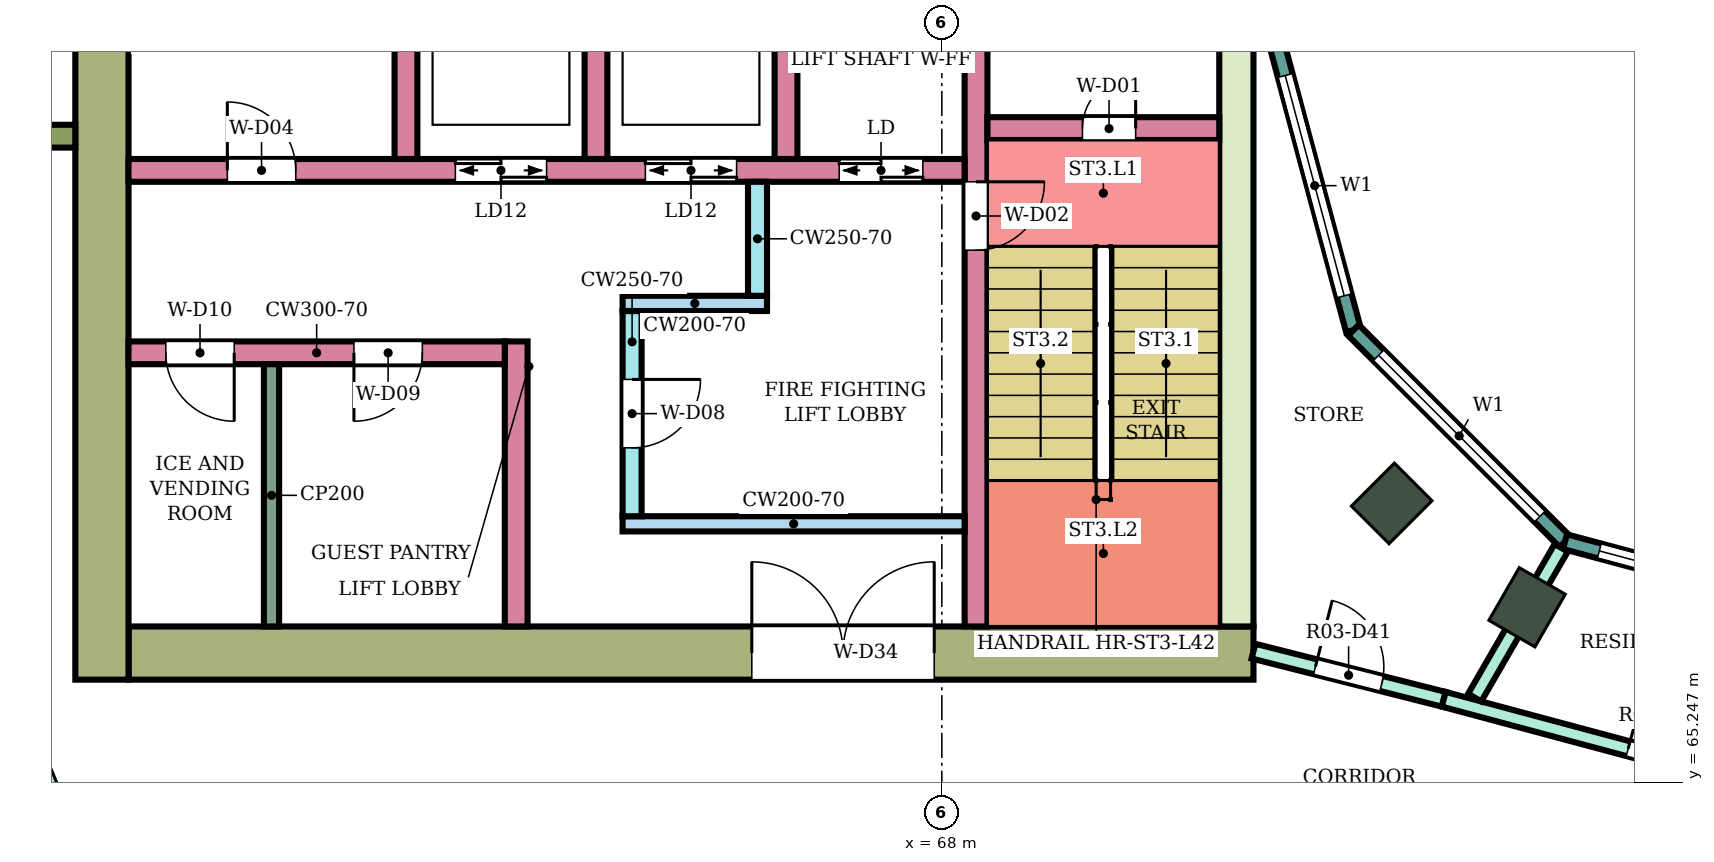
"""IFC4 building model, lengths in metres.
Left out: names, types, materials, properties, quantities, classifications, styles, units other than length and angle.
Written with IfcOpenShell. Run it as: python <this file> out.ifc"""

import sys

from ifc_helpers import new_model, si_unit, direction, frame, frame_2d, origin, origin_2d, place, context, subcontext, project, spatial, rectangle, extrude, element, fill, save


model = new_model("IFC4")
c1 = context("Model", 3, precision=1e-05, world=origin(), true_north=direction((0.0, 1.0)))
c2 = subcontext(c1, "Body", "Model", "MODEL_VIEW")
j1 = project(units=[si_unit("LENGTHUNIT", "METRE"), si_unit("PLANEANGLEUNIT", "RADIAN")], contexts=[c1])
p1 = place(None, origin())
s1 = spatial("IfcSite", under=j1, at=p1, CompositionType="ELEMENT")
p2 = place(p1, origin())
s2 = spatial("IfcBuilding", under=s1, at=p2, CompositionType="ELEMENT")
p3 = place(p2, frame((0.0, 0.0, 182.3)))
s3 = spatial("IfcBuildingStorey", under=s2, at=p3, CompositionType="ELEMENT", Elevation=182.3)
for number, where, z_axis, x_axis in (
    (1, (73.919, 68.919, 0.0), (0.0, 0.0, 1.0), (-0.707, -0.707, 0.0)),
    (2, (75.7, 67.552, 0.0), (0.0, 0.0, 1.0), (-0.5, -0.866, 0.0)),
):
    element("IfcColumn", number, at=place(p3, frame(where, z_axis=z_axis, x_axis=x_axis)), inside=s3, PredefinedType="COLUMN", context=c2, shape_type="SweptSolid", body=[
        extrude(rectangle(XDim=0.8, YDim=0.7, at=origin_2d()), origin(), (0.0, 0.0, 1.0), 4.1),
    ])
p4 = place(p3, frame((72.1, 66.95, 0.0), z_axis=(0.0, 0.0, 1.0), x_axis=(-1.0, 0.0, 0.0)))
e3 = element("IfcWall", 3, at=p4, inside=s3, PredefinedType="SHEAR", context=c2, shape_type="SweptSolid", body=[
    extrude(rectangle(XDim=14.8, YDim=0.7, at=frame_2d((7.4, 0.0))), origin(), (0.0, 0.0, 1.0), 3.78),
])
p5 = place(p4, frame((4.2, 0.0, 0.0)))
e4 = element("IfcOpeningElement", 4, at=p5, cuts=e3, PredefinedType="OPENING", context=c2, shape_type="SweptSolid", body=[
    extrude(rectangle(XDim=2.4, YDim=2.4, at=frame_2d((1.2, 1.2))), frame((0.0, 0.36, 0.0), z_axis=(0.0, -1.0, 0.0), x_axis=(1.0, 0.0, 0.0)), (0.0, 0.0, 1.0), 0.72),
])
p6 = place(p3, frame((71.875, 75.0, 0.0), z_axis=(0.0, 0.0, 1.0), x_axis=(0.0, -1.0, 0.0)))
e5 = element("IfcWall", 5, at=p6, inside=s3, PredefinedType="SHEAR", context=c2, shape_type="SweptSolid", body=[
    extrude(rectangle(XDim=7.7, YDim=0.45, at=frame_2d((3.85, 0.0))), origin(), (0.0, 0.0, 1.0), 3.78),
])
p7 = place(p3, frame((56.95, 83.4, 0.0), z_axis=(0.0, 0.0, 1.0), x_axis=(0.0, -1.0, 0.0)))
e6 = element("IfcWall", 6, at=p7, inside=s3, PredefinedType="SHEAR", context=c2, shape_type="SweptSolid", body=[
    extrude(rectangle(XDim=16.8, YDim=0.7, at=frame_2d((8.4, 0.0))), origin(), (0.0, 0.0, 1.0), 3.78),
])
p8 = place(p3, frame((68.45, 75.0, 0.0), z_axis=(0.0, 0.0, 1.0), x_axis=(0.0, -1.0, 0.0)))
e7 = element("IfcWall", 7, at=p8, inside=s3, PredefinedType="SHEAR", context=c2, shape_type="SweptSolid", body=[
    extrude(rectangle(XDim=7.7, YDim=0.3, at=frame_2d((3.85, 0.0))), origin(), (0.0, 0.0, 1.0), 3.78),
])
p9 = place(p8, frame((1.85, 0.0, 0.0)))
e8 = element("IfcOpeningElement", 8, at=p9, cuts=e7, PredefinedType="OPENING", context=c2, shape_type="SweptSolid", body=[
    extrude(rectangle(XDim=0.9, YDim=2.1, at=frame_2d((0.45, 1.05))), frame((0.0, 0.16, 0.0), z_axis=(0.0, -1.0, 0.0), x_axis=(1.0, 0.0, 0.0)), (0.0, 0.0, 1.0), 0.32),
])
p10 = place(p3, frame((71.65, 73.85, 0.0), z_axis=(0.0, 0.0, 1.0), x_axis=(-1.0, 0.0, 0.0)))
e9 = element("IfcWall", 9, at=p10, inside=s3, PredefinedType="SHEAR", context=c2, shape_type="SweptSolid", body=[
    extrude(rectangle(XDim=3.05, YDim=0.3, at=frame_2d((1.525, 0.0))), origin(), (0.0, 0.0, 1.0), 3.78),
])
p11 = place(p10, frame((1.1, 0.0, 0.0)))
e10 = element("IfcOpeningElement", 10, at=p11, cuts=e9, PredefinedType="OPENING", context=c2, shape_type="SweptSolid", body=[
    extrude(rectangle(XDim=0.7, YDim=2.0, at=frame_2d((0.35, 1.0))), frame((0.0, 0.16, 0.0), z_axis=(0.0, -1.0, 0.0), x_axis=(1.0, 0.0, 0.0)), (0.0, 0.0, 1.0), 0.32),
])
p12 = place(p3, frame((68.3, 73.3, 0.0), z_axis=(0.0, 0.0, 1.0), x_axis=(-1.0, 0.0, 0.0)))
e11 = element("IfcWall", 11, at=p12, inside=s3, PredefinedType="SHEAR", context=c2, shape_type="SweptSolid", body=[
    extrude(rectangle(XDim=11.0, YDim=0.3, at=frame_2d((5.5, 0.0))), origin(), (0.0, 0.0, 1.0), 3.78),
])
p13 = place(p12, frame((0.55, 0.0, 0.0)))
e12 = element("IfcOpeningElement", 12, at=p13, cuts=e11, PredefinedType="OPENING", context=c2, shape_type="SweptSolid", body=[
    extrude(rectangle(XDim=1.1, YDim=2.1, at=frame_2d((0.55, 1.05))), frame((0.0, 0.16, 0.0), z_axis=(0.0, -1.0, 0.0), x_axis=(1.0, 0.0, 0.0)), (0.0, 0.0, 1.0), 0.32),
])
p14 = place(p12, frame((3.0, 0.0, 0.0)))
e13 = element("IfcOpeningElement", 13, at=p14, cuts=e11, PredefinedType="OPENING", context=c2, shape_type="SweptSolid", body=[
    extrude(rectangle(XDim=1.2, YDim=2.1, at=frame_2d((0.6, 1.05))), frame((0.0, 0.16, 0.0), z_axis=(0.0, -1.0, 0.0), x_axis=(1.0, 0.0, 0.0)), (0.0, 0.0, 1.0), 0.32),
])
p15 = place(p12, frame((5.5, 0.0, 0.0)))
e14 = element("IfcOpeningElement", 14, at=p15, cuts=e11, PredefinedType="OPENING", context=c2, shape_type="SweptSolid", body=[
    extrude(rectangle(XDim=1.2, YDim=2.1, at=frame_2d((0.6, 1.05))), frame((0.0, 0.16, 0.0), z_axis=(0.0, -1.0, 0.0), x_axis=(1.0, 0.0, 0.0)), (0.0, 0.0, 1.0), 0.32),
])
p16 = place(p12, frame((8.8, 0.0, 0.0)))
e15 = element("IfcOpeningElement", 15, at=p16, cuts=e11, PredefinedType="OPENING", context=c2, shape_type="SweptSolid", body=[
    extrude(rectangle(XDim=0.9, YDim=2.1, at=frame_2d((0.45, 1.05))), frame((0.0, 0.16, 0.0), z_axis=(0.0, -1.0, 0.0), x_axis=(1.0, 0.0, 0.0)), (0.0, 0.0, 1.0), 0.32),
])
for number, where, z_axis, x_axis in (
    (16, (65.95, 76.0, 0.0), (0.0, 0.0, 1.0), (0.0, -1.0, 0.0)),
    (17, (63.45, 76.0, 0.0), (0.0, 0.0, 1.0), (0.0, -1.0, 0.0)),
    (18, (60.95, 76.0, 0.0), (0.0, 0.0, 1.0), (0.0, -1.0, 0.0)),
):
    element("IfcWall", number, at=place(p3, frame(where, z_axis=z_axis, x_axis=x_axis)), inside=s3, PredefinedType="SHEAR", context=c2, shape_type="SweptSolid", body=[
        extrude(rectangle(XDim=2.55, YDim=0.3, at=frame_2d((1.275, 0.0))), origin(), (0.0, 0.0, 1.0), 3.78),
    ])
p17 = place(p3, frame((68.3, 68.65, 0.0), z_axis=(0.0, 0.0, 1.0), x_axis=(-1.0, 0.0, 0.0)))
e19 = element("IfcWall", 19, at=p17, inside=s3, PredefinedType="SHEAR", context=c2, shape_type="SweptSolid", body=[
    extrude(rectangle(XDim=4.5, YDim=0.2, at=frame_2d((2.25, 0.0))), origin(), (0.0, 0.0, 1.0), 3.78),
])
p18 = place(p3, frame((63.925, 71.45, 0.0), z_axis=(0.0, 0.0, 1.0), x_axis=(0.0, -1.0, 0.0)))
e20 = element("IfcWall", 20, at=p18, inside=s3, PredefinedType="SHEAR", context=c2, shape_type="SweptSolid", body=[
    extrude(rectangle(XDim=2.7, YDim=0.25, at=frame_2d((1.35, 0.0))), origin(), (0.0, 0.0, 1.0), 3.78),
])
p19 = place(p18, frame((0.9, 0.0, 0.0)))
e21 = element("IfcOpeningElement", 21, at=p19, cuts=e20, PredefinedType="OPENING", context=c2, shape_type="SweptSolid", body=[
    extrude(rectangle(XDim=0.9, YDim=2.1, at=frame_2d((0.45, 1.05))), frame((0.0, 0.135, 0.0), z_axis=(0.0, -1.0, 0.0), x_axis=(1.0, 0.0, 0.0)), (0.0, 0.0, 1.0), 0.27),
])
p20 = place(p3, frame((65.7, 71.55, 0.0), z_axis=(0.0, 0.0, 1.0), x_axis=(-1.0, 0.0, 0.0)))
e22 = element("IfcWall", 22, at=p20, inside=s3, PredefinedType="SHEAR", context=c2, shape_type="SweptSolid", body=[
    extrude(rectangle(XDim=1.9, YDim=0.2, at=frame_2d((0.95, 0.0))), origin(), (0.0, 0.0, 1.0), 3.78),
])
p21 = place(p3, frame((65.575, 73.15, 0.0), z_axis=(0.0, 0.0, 1.0), x_axis=(0.0, -1.0, 0.0)))
e23 = element("IfcWall", 23, at=p21, inside=s3, PredefinedType="SHEAR", context=c2, shape_type="SweptSolid", body=[
    extrude(rectangle(XDim=1.5, YDim=0.25, at=frame_2d((0.75, 0.0))), origin(), (0.0, 0.0, 1.0), 3.78),
])
p22 = place(p3, frame((62.4, 71.05, 0.0), z_axis=(0.0, 0.0, 1.0), x_axis=(0.0, -1.0, 0.0)))
e24 = element("IfcWall", 24, at=p22, inside=s3, PredefinedType="SHEAR", context=c2, shape_type="SweptSolid", body=[
    extrude(rectangle(XDim=3.75, YDim=0.3, at=frame_2d((1.875, 0.0))), origin(), (0.0, 0.0, 1.0), 3.78),
])
p23 = place(p3, frame((62.25, 70.9, 0.0), z_axis=(0.0, 0.0, 1.0), x_axis=(-1.0, 0.0, 0.0)))
e25 = element("IfcWall", 25, at=p23, inside=s3, PredefinedType="SHEAR", context=c2, shape_type="SweptSolid", body=[
    extrude(rectangle(XDim=4.95, YDim=0.3, at=frame_2d((2.475, 0.0))), origin(), (0.0, 0.0, 1.0), 3.78),
])
p24 = place(p23, frame((1.084, 0.0, 0.0)))
e26 = element("IfcOpeningElement", 26, at=p24, cuts=e25, PredefinedType="OPENING", context=c2, shape_type="SweptSolid", body=[
    extrude(rectangle(XDim=0.9, YDim=2.1, at=frame_2d((0.45, 1.05))), frame((0.0, 0.16, 0.0), z_axis=(0.0, -1.0, 0.0), x_axis=(1.0, 0.0, 0.0)), (0.0, 0.0, 1.0), 0.32),
])
p25 = place(p23, frame((3.56, 0.0, 0.0)))
e27 = element("IfcOpeningElement", 27, at=p25, cuts=e25, PredefinedType="OPENING", context=c2, shape_type="SweptSolid", body=[
    extrude(rectangle(XDim=0.9, YDim=2.1, at=frame_2d((0.45, 1.05))), frame((0.0, 0.16, 0.0), z_axis=(0.0, -1.0, 0.0), x_axis=(1.0, 0.0, 0.0)), (0.0, 0.0, 1.0), 0.32),
])
p26 = place(p3, frame((56.6, 73.75, 0.0), z_axis=(0.0, 0.0, 1.0), x_axis=(-1.0, 0.0, 0.0)))
e28 = element("IfcWall", 28, at=p26, inside=s3, PredefinedType="NOTDEFINED", context=c2, shape_type="SweptSolid", body=[
    extrude(rectangle(XDim=2.416, YDim=0.3, at=frame_2d((1.208, 0.0))), origin(), (0.0, 0.0, 1.0), 4.1),
])
p27 = place(p3, frame((72.396, 75.0, 0.0), z_axis=(0.0, 0.0, 1.0), x_axis=(0.258789828301, -0.965933654434, 0.0)))
e29 = element("IfcWall", 29, at=p27, inside=s3, PredefinedType="NOTDEFINED", context=c2, shape_type="SweptSolid", body=[
    extrude(rectangle(XDim=3.936, YDim=0.2, at=frame_2d((1.968, 0.0))), origin(), (0.0, 0.0, 1.0), 4.1),
])
p28 = place(p27, frame((0.468, 0.0, 0.9)))
e30 = element("IfcOpeningElement", 30, at=p28, cuts=e29, PredefinedType="OPENING", context=c2, shape_type="SweptSolid", body=[
    extrude(rectangle(XDim=3.0, YDim=2.3, at=frame_2d((1.5, 1.15))), frame((0.0, 0.11, 0.0), z_axis=(0.0, -1.0, 0.0), x_axis=(1.0, 0.0, 0.0)), (0.0, 0.0, 1.0), 0.22),
])
p29 = place(p3, frame((73.415, 71.198, 0.0), z_axis=(0.0, 0.0, 1.0), x_axis=(0.707106781187, -0.707106781187, 0.0)))
e31 = element("IfcWall", 31, at=p29, inside=s3, PredefinedType="NOTDEFINED", context=c2, shape_type="SweptSolid", body=[
    extrude(rectangle(XDim=3.936, YDim=0.2, at=frame_2d((1.968, 0.0))), origin(), (0.0, 0.0, 1.0), 4.1),
])
p30 = place(p29, frame((0.468, 0.0, 0.9)))
e32 = element("IfcOpeningElement", 32, at=p30, cuts=e31, PredefinedType="OPENING", context=c2, shape_type="SweptSolid", body=[
    extrude(rectangle(XDim=3.0, YDim=2.3, at=frame_2d((1.5, 1.15))), frame((0.0, 0.11, 0.0), z_axis=(0.0, -1.0, 0.0), x_axis=(1.0, 0.0, 0.0)), (0.0, 0.0, 1.0), 0.22),
])
p31 = place(p3, frame((76.198, 68.415, 0.0), z_axis=(0.0, 0.0, 1.0), x_axis=(0.965933654434, -0.258789828301, 0.0)))
e33 = element("IfcWall", 33, at=p31, inside=s3, PredefinedType="NOTDEFINED", context=c2, shape_type="SweptSolid", body=[
    extrude(rectangle(XDim=3.936, YDim=0.2, at=frame_2d((1.968, 0.0))), origin(), (0.0, 0.0, 1.0), 4.1),
])
p32 = place(p31, frame((0.468, 0.0, 0.9)))
e34 = element("IfcOpeningElement", 34, at=p32, cuts=e33, PredefinedType="OPENING", context=c2, shape_type="SweptSolid", body=[
    extrude(rectangle(XDim=3.0, YDim=2.3, at=frame_2d((1.5, 1.15))), frame((0.0, 0.11, 0.0), z_axis=(0.0, -1.0, 0.0), x_axis=(1.0, 0.0, 0.0)), (0.0, 0.0, 1.0), 0.22),
])
p33 = place(p3, frame((72.1, 66.975, 0.0), z_axis=(0.0, 0.0, 1.0), x_axis=(0.969471314457, -0.245204752086, 0.0)))
e35 = element("IfcWall", 35, at=p33, inside=s3, PredefinedType="PARTITIONING", context=c2, shape_type="SweptSolid", body=[
    extrude(rectangle(XDim=2.582, YDim=0.2, at=frame_2d((1.291, 0.0))), origin(), (0.0, 0.0, 1.0), 3.65),
])
p34 = place(p33, frame((0.841, 0.0, 0.0)))
e36 = element("IfcOpeningElement", 36, at=p34, cuts=e35, PredefinedType="OPENING", context=c2, shape_type="SweptSolid", body=[
    extrude(rectangle(XDim=0.9, YDim=2.1, at=frame_2d((0.45, 1.05))), frame((0.0, 0.11, 0.0), z_axis=(0.0, -1.0, 0.0), x_axis=(1.0, 0.0, 0.0)), (0.0, 0.0, 1.0), 0.22),
])
p35 = place(p3, frame((74.603, 66.342, 0.0), z_axis=(0.0, 0.0, 1.0), x_axis=(0.965920893652, -0.258837453254, 0.0)))
e37 = element("IfcWall", 37, at=p35, inside=s3, PredefinedType="PARTITIONING", context=c2, shape_type="SweptSolid", body=[
    extrude(rectangle(XDim=5.458, YDim=0.2, at=frame_2d((2.729, 0.0))), origin(), (0.0, 0.0, 1.0), 3.65),
])
p36 = place(p35, frame((2.512, 0.0, 0.0)))
e38 = element("IfcOpeningElement", 38, at=p36, cuts=e37, PredefinedType="OPENING", context=c2, shape_type="SweptSolid", body=[
    extrude(rectangle(XDim=0.9, YDim=2.1, at=frame_2d((0.45, 1.05))), frame((0.0, 0.11, 0.0), z_axis=(0.0, -1.0, 0.0), x_axis=(1.0, 0.0, 0.0)), (0.0, 0.0, 1.0), 0.22),
])
p37 = place(p3, frame((75.01, 66.364, 0.0), z_axis=(0.0, 0.0, 1.0), x_axis=(0.500097042406, 0.865969369075, 0.0)))
e39 = element("IfcWall", 39, at=p37, inside=s3, PredefinedType="PARTITIONING", context=c2, shape_type="SweptSolid", body=[
    extrude(rectangle(XDim=2.275, YDim=0.2, at=frame_2d((1.138, 0.0))), origin(), (0.0, 0.0, 1.0), 3.65),
])
p38 = place(p3, frame((59.181, 70.75, 0.0), z_axis=(0.0, 0.0, 1.0), x_axis=(0.0, -1.0, 0.0)))
e40 = element("IfcWall", 40, at=p38, inside=s3, PredefinedType="PARTITIONING", context=c2, shape_type="SweptSolid", body=[
    extrude(rectangle(XDim=3.45, YDim=0.2, at=frame_2d((1.725, 0.0))), origin(), (0.0, 0.0, 1.0), 3.78),
])
p39 = place(p28, origin())
e41 = element("IfcWindow", 41, at=p39, inside=s3, PartitioningType="SINGLE_PANEL", PredefinedType="WINDOW", context=c2, shape_type="SweptSolid", body=[
    extrude(rectangle(XDim=3.0, YDim=2.3, at=frame_2d((1.5, 1.15))), frame((0.0, 0.03, 0.0), z_axis=(0.0, -1.0, 0.0), x_axis=(1.0, 0.0, 0.0)), (0.0, 0.0, 1.0), 0.06),
])
fill(e30, e41)
p40 = place(p30, origin())
e42 = element("IfcWindow", 42, at=p40, inside=s3, PartitioningType="SINGLE_PANEL", PredefinedType="WINDOW", context=c2, shape_type="SweptSolid", body=[
    extrude(rectangle(XDim=3.0, YDim=2.3, at=frame_2d((1.5, 1.15))), frame((0.0, 0.03, 0.0), z_axis=(0.0, -1.0, 0.0), x_axis=(1.0, 0.0, 0.0)), (0.0, 0.0, 1.0), 0.06),
])
fill(e32, e42)
p41 = place(p32, origin())
e43 = element("IfcWindow", 43, at=p41, inside=s3, PartitioningType="SINGLE_PANEL", PredefinedType="WINDOW", context=c2, shape_type="SweptSolid", body=[
    extrude(rectangle(XDim=3.0, YDim=2.3, at=frame_2d((1.5, 1.15))), frame((0.0, 0.03, 0.0), z_axis=(0.0, -1.0, 0.0), x_axis=(1.0, 0.0, 0.0)), (0.0, 0.0, 1.0), 0.06),
])
fill(e34, e43)
p42 = place(p36, origin())
e44 = element("IfcDoor", 44, at=p42, inside=s3, OperationType="SINGLE_SWING_LEFT", PredefinedType="DOOR", context=c2, shape_type="SweptSolid", body=[
    extrude(rectangle(XDim=0.9, YDim=2.1, at=frame_2d((0.45, 1.05))), frame((0.0, 0.025, 0.0), z_axis=(0.0, -1.0, 0.0), x_axis=(1.0, 0.0, 0.0)), (0.0, 0.0, 1.0), 0.05),
])
fill(e38, e44)
p43 = place(p34, origin())
e45 = element("IfcDoor", 45, at=p43, inside=s3, OperationType="SINGLE_SWING_LEFT", PredefinedType="DOOR", context=c2, shape_type="SweptSolid", body=[
    extrude(rectangle(XDim=0.9, YDim=2.1, at=frame_2d((0.45, 1.05))), frame((0.0, 0.025, 0.0), z_axis=(0.0, -1.0, 0.0), x_axis=(1.0, 0.0, 0.0)), (0.0, 0.0, 1.0), 0.05),
])
fill(e36, e45)
p44 = place(p11, frame((0.7, 0.0, 0.0), z_axis=(0.0, 0.0, 1.0), x_axis=(-1.0, 0.0, 0.0)))
e46 = element("IfcDoor", 46, at=p44, inside=s3, OperationType="SINGLE_SWING_RIGHT", PredefinedType="DOOR", context=c2, shape_type="SweptSolid", body=[
    extrude(rectangle(XDim=0.7, YDim=2.0, at=frame_2d((0.35, 1.0))), frame((0.0, 0.025, 0.0), z_axis=(0.0, -1.0, 0.0), x_axis=(1.0, 0.0, 0.0)), (0.0, 0.0, 1.0), 0.05),
])
fill(e10, e46)
p45 = place(p9, origin())
e47 = element("IfcDoor", 47, at=p45, inside=s3, OperationType="SINGLE_SWING_LEFT", PredefinedType="DOOR", context=c2, shape_type="SweptSolid", body=[
    extrude(rectangle(XDim=0.9, YDim=2.1, at=frame_2d((0.45, 1.05))), frame((0.0, 0.025, 0.0), z_axis=(0.0, -1.0, 0.0), x_axis=(1.0, 0.0, 0.0)), (0.0, 0.0, 1.0), 0.05),
])
fill(e8, e47)
p46 = place(p13, origin())
e48 = element("IfcDoor", 48, at=p46, inside=s3, OperationType="DOUBLE_DOOR_SLIDING", PredefinedType="DOOR", context=c2, shape_type="SweptSolid", body=[
    extrude(rectangle(XDim=1.1, YDim=2.1, at=frame_2d((0.55, 1.05))), frame((0.0, 0.025, 0.0), z_axis=(0.0, -1.0, 0.0), x_axis=(1.0, 0.0, 0.0)), (0.0, 0.0, 1.0), 0.05),
])
fill(e12, e48)
p47 = place(p14, origin())
e49 = element("IfcDoor", 49, at=p47, inside=s3, OperationType="DOUBLE_DOOR_SLIDING", PredefinedType="DOOR", context=c2, shape_type="SweptSolid", body=[
    extrude(rectangle(XDim=1.2, YDim=2.1, at=frame_2d((0.6, 1.05))), frame((0.0, 0.025, 0.0), z_axis=(0.0, -1.0, 0.0), x_axis=(1.0, 0.0, 0.0)), (0.0, 0.0, 1.0), 0.05),
])
fill(e13, e49)
p48 = place(p15, origin())
e50 = element("IfcDoor", 50, at=p48, inside=s3, OperationType="DOUBLE_DOOR_SLIDING", PredefinedType="DOOR", context=c2, shape_type="SweptSolid", body=[
    extrude(rectangle(XDim=1.2, YDim=2.1, at=frame_2d((0.6, 1.05))), frame((0.0, 0.025, 0.0), z_axis=(0.0, -1.0, 0.0), x_axis=(1.0, 0.0, 0.0)), (0.0, 0.0, 1.0), 0.05),
])
fill(e14, e50)
p49 = place(p16, frame((0.9, 0.0, 0.0), z_axis=(0.0, 0.0, 1.0), x_axis=(-1.0, 0.0, 0.0)))
e51 = element("IfcDoor", 51, at=p49, inside=s3, OperationType="SINGLE_SWING_LEFT", PredefinedType="DOOR", context=c2, shape_type="SweptSolid", body=[
    extrude(rectangle(XDim=0.9, YDim=2.1, at=frame_2d((0.45, 1.05))), frame((0.0, 0.025, 0.0), z_axis=(0.0, -1.0, 0.0), x_axis=(1.0, 0.0, 0.0)), (0.0, 0.0, 1.0), 0.05),
])
fill(e15, e51)
p50 = place(p19, origin())
e52 = element("IfcDoor", 52, at=p50, inside=s3, OperationType="SINGLE_SWING_LEFT", PredefinedType="DOOR", context=c2, shape_type="SweptSolid", body=[
    extrude(rectangle(XDim=0.9, YDim=2.1, at=frame_2d((0.45, 1.05))), frame((0.0, 0.025, 0.0), z_axis=(0.0, -1.0, 0.0), x_axis=(1.0, 0.0, 0.0)), (0.0, 0.0, 1.0), 0.05),
])
fill(e21, e52)
p51 = place(p24, origin())
e53 = element("IfcDoor", 53, at=p51, inside=s3, OperationType="SINGLE_SWING_RIGHT", PredefinedType="DOOR", context=c2, shape_type="SweptSolid", body=[
    extrude(rectangle(XDim=0.9, YDim=2.1, at=frame_2d((0.45, 1.05))), frame((0.0, 0.025, 0.0), z_axis=(0.0, -1.0, 0.0), x_axis=(1.0, 0.0, 0.0)), (0.0, 0.0, 1.0), 0.05),
])
fill(e26, e53)
p52 = place(p25, origin())
e54 = element("IfcDoor", 54, at=p52, inside=s3, OperationType="SINGLE_SWING_LEFT", PredefinedType="DOOR", context=c2, shape_type="SweptSolid", body=[
    extrude(rectangle(XDim=0.9, YDim=2.1, at=frame_2d((0.45, 1.05))), frame((0.0, 0.025, 0.0), z_axis=(0.0, -1.0, 0.0), x_axis=(1.0, 0.0, 0.0)), (0.0, 0.0, 1.0), 0.05),
])
fill(e27, e54)
p53 = place(p5, frame((2.4, 0.0, 0.0), z_axis=(0.0, 0.0, 1.0), x_axis=(-1.0, 0.0, 0.0)))
e55 = element("IfcDoor", 55, at=p53, inside=s3, OperationType="DOUBLE_DOOR_SINGLE_SWING", PredefinedType="DOOR", context=c2, shape_type="SweptSolid", body=[
    extrude(rectangle(XDim=2.4, YDim=2.4, at=frame_2d((1.2, 1.2))), frame((0.0, 0.025, 0.0), z_axis=(0.0, -1.0, 0.0), x_axis=(1.0, 0.0, 0.0)), (0.0, 0.0, 1.0), 0.05),
])
fill(e4, e55)
save(model, sys.argv[1])
